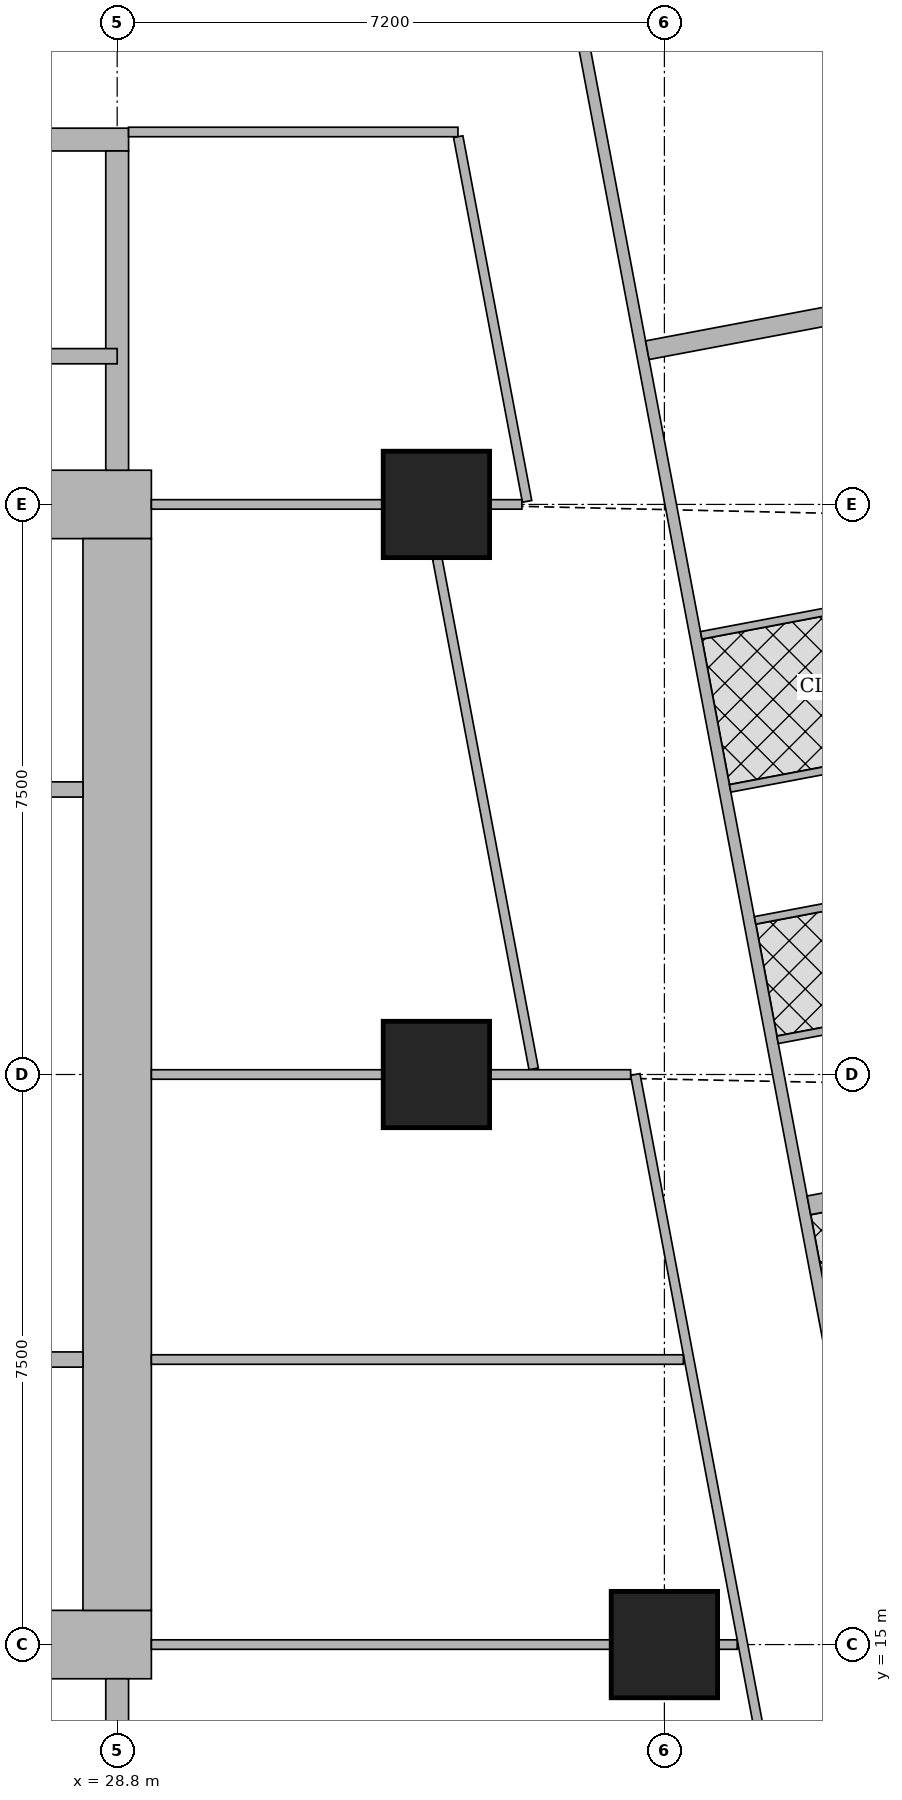
"""IFC4 building model, lengths in metres.
Left out: names, types, materials, properties, quantities, classifications, styles, units other than length and angle.
Written with IfcOpenShell. Run it as: python <this file> out.ifc"""

import sys

from ifc_helpers import new_model, si_unit, direction, frame, frame_2d, origin, origin_2d, place, context, subcontext, project, spatial, rectangle, extrude, element, fill, save


model = new_model("IFC4")
c1 = context("Model", 3, precision=1e-05, world=origin(), true_north=direction((0.0, 1.0)))
c2 = subcontext(c1, "Body", "Model", "MODEL_VIEW")
j1 = project(units=[si_unit("LENGTHUNIT", "METRE"), si_unit("PLANEANGLEUNIT", "RADIAN")], contexts=[c1])
p1 = place(None, origin())
s1 = spatial("IfcSite", under=j1, at=p1, CompositionType="ELEMENT")
p2 = place(p1, origin())
s2 = spatial("IfcBuilding", under=s1, at=p2, CompositionType="ELEMENT")
p3 = place(p2, frame((0.0, 0.0, 251.6)))
s3 = spatial("IfcBuildingStorey", under=s2, at=p3, CompositionType="ELEMENT", Elevation=251.6)
for number, where, z_axis, x_axis in (
    (1, (36.0, 15.0, 0.0), (0.0, 0.0, 1.0), (1.0, 0.0, 0.0)),
    (2, (33.0, 22.5, 0.0), (0.0, 0.0, 1.0), (1.0, 0.0, 0.0)),
    (3, (33.0, 30.0, 0.0), (0.0, 0.0, 1.0), (1.0, 0.0, 0.0)),
):
    element("IfcColumn", number, at=place(p3, frame(where, z_axis=z_axis, x_axis=x_axis)), inside=s3, PredefinedType="COLUMN", context=c2, shape_type="SweptSolid", body=[
        extrude(rectangle(XDim=1.4, YDim=1.4, at=origin_2d()), origin(), (0.0, 0.0, 1.0), 3.75),
    ])
p4 = place(p3, frame((13.95, 15.0, 0.0), z_axis=(0.0, 0.0, 1.0), x_axis=(1.0, 0.0, 0.0)))
e4 = element("IfcWall", 4, at=p4, inside=s3, PredefinedType="SHEAR", context=c2, shape_type="SweptSolid", body=[
    extrude(rectangle(XDim=15.3, YDim=0.9, at=frame_2d((7.65, 0.0))), origin(), (0.0, 0.0, 1.0), 3.75),
])
p5 = place(p4, frame((4.45, 0.0, 0.0)))
e5 = element("IfcOpeningElement", 5, at=p5, cuts=e4, PredefinedType="OPENING", context=c2, shape_type="SweptSolid", body=[
    extrude(rectangle(XDim=1.8, YDim=2.1, at=frame_2d((0.9, 1.05))), frame((0.0, 0.46, 0.0), z_axis=(0.0, -1.0, 0.0), x_axis=(1.0, 0.0, 0.0)), (0.0, 0.0, 1.0), 0.92),
])
p6 = place(p4, frame((10.7, 0.0, 0.0)))
e6 = element("IfcOpeningElement", 6, at=p6, cuts=e4, PredefinedType="OPENING", context=c2, shape_type="SweptSolid", body=[
    extrude(rectangle(XDim=1.1, YDim=2.1, at=frame_2d((0.55, 1.05))), frame((0.0, 0.46, 0.0), z_axis=(0.0, -1.0, 0.0), x_axis=(1.0, 0.0, 0.0)), (0.0, 0.0, 1.0), 0.92),
])
p7 = place(p3, frame((13.95, 30.0, 0.0), z_axis=(0.0, 0.0, 1.0), x_axis=(1.0, 0.0, 0.0)))
e7 = element("IfcWall", 7, at=p7, inside=s3, PredefinedType="SHEAR", context=c2, shape_type="SweptSolid", body=[
    extrude(rectangle(XDim=15.3, YDim=0.9, at=frame_2d((7.65, 0.0))), origin(), (0.0, 0.0, 1.0), 3.75),
])
p8 = place(p7, frame((4.45, 0.0, 0.0)))
e8 = element("IfcOpeningElement", 8, at=p8, cuts=e7, PredefinedType="OPENING", context=c2, shape_type="SweptSolid", body=[
    extrude(rectangle(XDim=1.8, YDim=2.1, at=frame_2d((0.9, 1.05))), frame((0.0, 0.46, 0.0), z_axis=(0.0, -1.0, 0.0), x_axis=(1.0, 0.0, 0.0)), (0.0, 0.0, 1.0), 0.92),
])
p9 = place(p7, frame((10.7, 0.0, 0.0)))
e9 = element("IfcOpeningElement", 9, at=p9, cuts=e7, PredefinedType="OPENING", context=c2, shape_type="SweptSolid", body=[
    extrude(rectangle(XDim=1.1, YDim=2.1, at=frame_2d((0.55, 1.05))), frame((0.0, 0.46, 0.0), z_axis=(0.0, -1.0, 0.0), x_axis=(1.0, 0.0, 0.0)), (0.0, 0.0, 1.0), 0.92),
])
p10 = place(p3, frame((28.8, 15.45, 0.0), z_axis=(0.0, 0.0, 1.0), x_axis=(0.0, 1.0, 0.0)))
e10 = element("IfcWall", 10, at=p10, inside=s3, PredefinedType="SHEAR", context=c2, shape_type="SweptSolid", body=[
    extrude(rectangle(XDim=14.1, YDim=0.9, at=frame_2d((7.05, 0.0))), origin(), (0.0, 0.0, 1.0), 3.75),
])
p11 = place(p3, frame((28.8, 10.35, 0.0), z_axis=(0.0, 0.0, 1.0), x_axis=(0.0, 1.0, 0.0)))
e11 = element("IfcWall", 11, at=p11, inside=s3, PredefinedType="SHEAR", context=c2, shape_type="SweptSolid", body=[
    extrude(rectangle(XDim=4.2, YDim=0.3, at=frame_2d((2.1, 0.0))), origin(), (0.0, 0.0, 1.0), 3.75),
])
p12 = place(p3, frame((21.45, 34.8, 0.0), z_axis=(0.0, 0.0, 1.0), x_axis=(1.0, 0.0, 0.0)))
e12 = element("IfcWall", 12, at=p12, inside=s3, PredefinedType="SHEAR", context=c2, shape_type="SweptSolid", body=[
    extrude(rectangle(XDim=7.5, YDim=0.3, at=frame_2d((3.75, 0.0))), origin(), (0.0, 0.0, 1.0), 3.75),
])
p13 = place(p12, frame((0.5, 0.0, 0.0)))
e13 = element("IfcOpeningElement", 13, at=p13, cuts=e12, PredefinedType="OPENING", context=c2, shape_type="SweptSolid", body=[
    extrude(rectangle(XDim=1.1, YDim=2.1, at=frame_2d((0.55, 1.05))), frame((0.0, 0.16, 0.0), z_axis=(0.0, -1.0, 0.0), x_axis=(1.0, 0.0, 0.0)), (0.0, 0.0, 1.0), 0.32),
])
p14 = place(p3, frame((28.8, 30.45, 0.0), z_axis=(0.0, 0.0, 1.0), x_axis=(0.0, 1.0, 0.0)))
e14 = element("IfcWall", 14, at=p14, inside=s3, PredefinedType="SHEAR", context=c2, shape_type="SweptSolid", body=[
    extrude(rectangle(XDim=4.2, YDim=0.3, at=frame_2d((2.1, 0.0))), origin(), (0.0, 0.0, 1.0), 3.75),
])
p15 = place(p3, frame((33.781, 42.186, 0.0), z_axis=(0.0, 0.0, 1.0), x_axis=(0.185593518645, -0.9826266055, 0.0)))
e15 = element("IfcWall", 15, at=p15, inside=s3, PredefinedType="SOLIDWALL", context=c2, shape_type="SweptSolid", body=[
    extrude(rectangle(XDim=35.961, YDim=0.15, at=frame_2d((17.98, 0.0))), origin(), (0.0, 0.0, 1.0), 2.5),
])
p16 = place(p15, frame((7.183, 0.0, 0.0)))
e16 = element("IfcOpeningElement", 16, at=p16, cuts=e15, PredefinedType="OPENING", context=c2, shape_type="SweptSolid", body=[
    extrude(rectangle(XDim=1.0, YDim=2.1, at=frame_2d((0.5, 1.05))), frame((0.0, 0.085, 0.0), z_axis=(0.0, -1.0, 0.0), x_axis=(1.0, 0.0, 0.0)), (0.0, 0.0, 1.0), 0.17),
])
p17 = place(p15, frame((11.76, 0.0, 0.0)))
e17 = element("IfcOpeningElement", 17, at=p17, cuts=e15, PredefinedType="OPENING", context=c2, shape_type="SweptSolid", body=[
    extrude(rectangle(XDim=1.0, YDim=2.1, at=frame_2d((0.5, 1.05))), frame((0.0, 0.085, 0.0), z_axis=(0.0, -1.0, 0.0), x_axis=(1.0, 0.0, 0.0)), (0.0, 0.0, 1.0), 0.17),
])
p18 = place(p15, frame((23.863, 0.0, 0.0)))
e18 = element("IfcOpeningElement", 18, at=p18, cuts=e15, PredefinedType="OPENING", context=c2, shape_type="SweptSolid", body=[
    extrude(rectangle(XDim=1.0, YDim=2.1, at=frame_2d((0.5, 1.05))), frame((0.0, 0.085, 0.0), z_axis=(0.0, -1.0, 0.0), x_axis=(1.0, 0.0, 0.0)), (0.0, 0.0, 1.0), 0.17),
])
p19 = place(p15, frame((30.502, 0.0, 0.0)))
e19 = element("IfcOpeningElement", 19, at=p19, cuts=e15, PredefinedType="OPENING", context=c2, shape_type="SweptSolid", body=[
    extrude(rectangle(XDim=1.0, YDim=2.1, at=frame_2d((0.5, 1.05))), frame((0.0, 0.085, 0.0), z_axis=(0.0, -1.0, 0.0), x_axis=(1.0, 0.0, 0.0)), (0.0, 0.0, 1.0), 0.17),
])
p20 = place(p3, frame((39.948, 28.933, 0.0), z_axis=(0.0, 0.0, 1.0), x_axis=(-0.982588017646, -0.185797706064, 0.0)))
e20 = element("IfcWall", 20, at=p20, inside=s3, PredefinedType="PARTITIONING", context=c2, shape_type="SweptSolid", body=[
    extrude(rectangle(XDim=3.525, YDim=0.1, at=frame_2d((1.763, 0.0))), origin(), (0.0, 0.0, 1.0), 3.5),
])
p21 = place(p3, frame((40.656, 25.183, 0.0), z_axis=(0.0, 0.0, 1.0), x_axis=(-0.982576058723, -0.185860939478, 0.0)))
e21 = element("IfcWall", 21, at=p21, inside=s3, PredefinedType="PARTITIONING", context=c2, shape_type="SweptSolid", body=[
    extrude(rectangle(XDim=3.524, YDim=0.1, at=frame_2d((1.762, 0.0))), origin(), (0.0, 0.0, 1.0), 3.5),
])
p22 = place(p3, frame((40.329, 26.918, 0.0), z_axis=(0.0, 0.0, 1.0), x_axis=(-0.982638553676, -0.185530247748, 0.0)))
e22 = element("IfcWall", 22, at=p22, inside=s3, PredefinedType="PARTITIONING", context=c2, shape_type="SweptSolid", body=[
    extrude(rectangle(XDim=3.525, YDim=0.1, at=frame_2d((1.763, 0.0))), origin(), (0.0, 0.0, 1.0), 3.5),
])
p23 = place(p3, frame((40.954, 23.61, 0.0), z_axis=(0.0, 0.0, 1.0), x_axis=(-0.98264808502, -0.18547975902, 0.0)))
e23 = element("IfcWall", 23, at=p23, inside=s3, PredefinedType="PARTITIONING", context=c2, shape_type="SweptSolid", body=[
    extrude(rectangle(XDim=3.526, YDim=0.1, at=frame_2d((1.763, 0.0))), origin(), (0.0, 0.0, 1.0), 2.5),
])
p24 = place(p3, frame((40.468, 32.915, 0.0), z_axis=(0.0, 0.0, 1.0), x_axis=(-0.982635807605, -0.185544791394, 0.0)))
e24 = element("IfcWall", 24, at=p24, inside=s3, PredefinedType="SOLIDWALL", context=c2, shape_type="SweptSolid", body=[
    extrude(rectangle(XDim=4.775, YDim=0.25, at=frame_2d((2.388, 0.0))), origin(), (0.0, 0.0, 1.0), 3.5),
])
p25 = place(p3, frame((42.593, 21.665, 0.0), z_axis=(0.0, 0.0, 1.0), x_axis=(-0.982635807605, -0.185544791394, 0.0)))
e25 = element("IfcWall", 25, at=p25, inside=s3, PredefinedType="SOLIDWALL", context=c2, shape_type="SweptSolid", body=[
    extrude(rectangle(XDim=4.775, YDim=0.25, at=frame_2d((2.388, 0.0))), origin(), (0.0, 0.0, 1.0), 2.5),
])
p26 = place(p3, frame((28.95, 34.9, 0.0), z_axis=(0.0, 0.0, 1.0), x_axis=(1.0, 0.0, 0.0)))
e26 = element("IfcWall", 26, at=p26, inside=s3, PredefinedType="PARTITIONING", context=c2, shape_type="SweptSolid", body=[
    extrude(rectangle(XDim=4.334, YDim=0.125, at=frame_2d((2.167, 0.0))), origin(), (0.0, 0.0, 1.0), 3.5),
])
p27 = place(p3, frame((37.947, 10.163, 0.0), z_axis=(0.0, 0.0, 1.0), x_axis=(-0.185589250699, 0.982627411599, 0.0)))
e27 = element("IfcWall", 27, at=p27, inside=s3, PredefinedType="PARTITIONING", context=c2, shape_type="SweptSolid", body=[
    extrude(rectangle(XDim=12.555, YDim=0.125, at=frame_2d((6.277, 0.0))), origin(), (0.0, 0.0, 1.0), 2.5),
])
p28 = place(p27, frame((0.708, 0.0, 0.0)))
e28 = element("IfcOpeningElement", 28, at=p28, cuts=e27, PredefinedType="OPENING", context=c2, shape_type="SweptSolid", body=[
    extrude(rectangle(XDim=1.0, YDim=2.1, at=frame_2d((0.5, 1.05))), frame((0.0, 0.073, 0.0), z_axis=(0.0, -1.0, 0.0), x_axis=(1.0, 0.0, 0.0)), (0.0, 0.0, 1.0), 0.145),
])
p29 = place(p27, frame((5.9, 0.0, 0.0)))
e29 = element("IfcOpeningElement", 29, at=p29, cuts=e27, PredefinedType="OPENING", context=c2, shape_type="SweptSolid", body=[
    extrude(rectangle(XDim=1.0, YDim=2.1, at=frame_2d((0.5, 1.05))), frame((0.0, 0.073, 0.0), z_axis=(0.0, -1.0, 0.0), x_axis=(1.0, 0.0, 0.0)), (0.0, 0.0, 1.0), 0.145),
])
p30 = place(p27, frame((9.562, 0.0, 0.0)))
e30 = element("IfcOpeningElement", 30, at=p30, cuts=e27, PredefinedType="OPENING", context=c2, shape_type="SweptSolid", body=[
    extrude(rectangle(XDim=1.0, YDim=2.1, at=frame_2d((0.5, 1.05))), frame((0.0, 0.073, 0.0), z_axis=(0.0, -1.0, 0.0), x_axis=(1.0, 0.0, 0.0)), (0.0, 0.0, 1.0), 0.145),
])
p31 = place(p3, frame((34.193, 30.04, 0.0), z_axis=(0.0, 0.0, 1.0), x_axis=(-0.185556349615, 0.98263362507, 0.0)))
e31 = element("IfcWall", 31, at=p31, inside=s3, PredefinedType="PARTITIONING", context=c2, shape_type="SweptSolid", body=[
    extrude(rectangle(XDim=4.883, YDim=0.125, at=frame_2d((2.441, 0.0))), origin(), (0.0, 0.0, 1.0), 2.5),
])
p32 = place(p31, frame((0.95, 0.0, 0.0)))
e32 = element("IfcOpeningElement", 32, at=p32, cuts=e31, PredefinedType="OPENING", context=c2, shape_type="SweptSolid", body=[
    extrude(rectangle(XDim=1.0, YDim=2.1, at=frame_2d((0.5, 1.05))), frame((0.0, 0.073, 0.0), z_axis=(0.0, -1.0, 0.0), x_axis=(1.0, 0.0, 0.0)), (0.0, 0.0, 1.0), 0.145),
])
p33 = place(p3, frame((34.28, 22.574, 0.0), z_axis=(0.0, 0.0, 1.0), x_axis=(-0.185610991981, 0.982623305064, 0.0)))
e33 = element("IfcWall", 33, at=p33, inside=s3, PredefinedType="PARTITIONING", context=c2, shape_type="SweptSolid", body=[
    extrude(rectangle(XDim=6.832, YDim=0.125, at=frame_2d((3.416, 0.0))), origin(), (0.0, 0.0, 1.0), 2.5),
])
p34 = place(p33, frame((3.241, 0.0, 0.0)))
e34 = element("IfcOpeningElement", 34, at=p34, cuts=e33, PredefinedType="OPENING", context=c2, shape_type="SweptSolid", body=[
    extrude(rectangle(XDim=1.0, YDim=2.1, at=frame_2d((0.5, 1.05))), frame((0.0, 0.073, 0.0), z_axis=(0.0, -1.0, 0.0), x_axis=(1.0, 0.0, 0.0)), (0.0, 0.0, 1.0), 0.145),
])
p35 = place(p3, frame((29.25, 15.0, 0.0), z_axis=(0.0, 0.0, 1.0), x_axis=(1.0, 0.0, 0.0)))
e35 = element("IfcWall", 35, at=p35, inside=s3, PredefinedType="PARTITIONING", context=c2, shape_type="SweptSolid", body=[
    extrude(rectangle(XDim=6.049, YDim=0.125, at=frame_2d((3.024, 0.0))), origin(), (0.0, 0.0, 1.0), 3.5),
])
p36 = place(p3, frame((36.701, 15.0, 0.0), z_axis=(0.0, 0.0, 1.0), x_axis=(1.0, 0.0, 0.0)))
e36 = element("IfcWall", 36, at=p36, inside=s3, PredefinedType="PARTITIONING", context=c2, shape_type="SweptSolid", body=[
    extrude(rectangle(XDim=0.257, YDim=0.125, at=frame_2d((0.128, 0.0))), origin(), (0.0, 0.0, 1.0), 3.5),
])
p37 = place(p3, frame((29.25, 18.75, 0.0), z_axis=(0.0, 0.0, 1.0), x_axis=(1.0, 0.0, 0.0)))
e37 = element("IfcWall", 37, at=p37, inside=s3, PredefinedType="PARTITIONING", context=c2, shape_type="SweptSolid", body=[
    extrude(rectangle(XDim=7.0, YDim=0.125, at=frame_2d((3.5, 0.0))), origin(), (0.0, 0.0, 1.0), 3.5),
])
p38 = place(p3, frame((29.25, 22.5, 0.0), z_axis=(0.0, 0.0, 1.0), x_axis=(1.0, 0.0, 0.0)))
e38 = element("IfcWall", 38, at=p38, inside=s3, PredefinedType="PARTITIONING", context=c2, shape_type="SweptSolid", body=[
    extrude(rectangle(XDim=3.049, YDim=0.125, at=frame_2d((1.524, 0.0))), origin(), (0.0, 0.0, 1.0), 3.5),
])
p39 = place(p3, frame((33.701, 22.5, 0.0), z_axis=(0.0, 0.0, 1.0), x_axis=(1.0, 0.0, 0.0)))
e39 = element("IfcWall", 39, at=p39, inside=s3, PredefinedType="PARTITIONING", context=c2, shape_type="SweptSolid", body=[
    extrude(rectangle(XDim=1.855, YDim=0.125, at=frame_2d((0.927, 0.0))), origin(), (0.0, 0.0, 1.0), 2.5),
])
p40 = place(p3, frame((29.25, 30.0, 0.0), z_axis=(0.0, 0.0, 1.0), x_axis=(1.0, 0.0, 0.0)))
e40 = element("IfcWall", 40, at=p40, inside=s3, PredefinedType="PARTITIONING", context=c2, shape_type="SweptSolid", body=[
    extrude(rectangle(XDim=3.049, YDim=0.125, at=frame_2d((1.524, 0.0))), origin(), (0.0, 0.0, 1.0), 3.5),
])
p41 = place(p3, frame((33.701, 30.0, 0.0), z_axis=(0.0, 0.0, 1.0), x_axis=(1.0, 0.0, 0.0)))
e41 = element("IfcWall", 41, at=p41, inside=s3, PredefinedType="PARTITIONING", context=c2, shape_type="SweptSolid", body=[
    extrude(rectangle(XDim=0.424, YDim=0.125, at=frame_2d((0.212, 0.0))), origin(), (0.0, 0.0, 1.0), 2.5),
])
p42 = place(p3, frame((23.0, 31.95, 0.0), z_axis=(0.0, 0.0, 1.0), x_axis=(1.0, 0.0, 0.0)))
e42 = element("IfcWall", 42, at=p42, inside=s3, PredefinedType="SHEAR", context=c2, shape_type="SweptSolid", body=[
    extrude(rectangle(XDim=5.8, YDim=0.2, at=frame_2d((2.9, 0.0))), origin(), (0.0, 0.0, 1.0), 3.75),
])
for number, where, z_axis, x_axis in (
    (43, (27.4, 18.75, 0.0), (0.0, 0.0, 1.0), (1.0, 0.0, 0.0)),
    (44, (27.4, 26.25, 0.0), (0.0, 0.0, 1.0), (1.0, 0.0, 0.0)),
):
    element("IfcWall", number, at=place(p3, frame(where, z_axis=z_axis, x_axis=x_axis)), inside=s3, PredefinedType="SOLIDWALL", context=c2, shape_type="SweptSolid", body=[
        extrude(rectangle(XDim=0.95, YDim=0.2, at=frame_2d((0.475, 0.0))), origin(), (0.0, 0.0, 1.0), 3.5),
    ])
p43 = place(p16, origin())
e45 = element("IfcDoor", 45, at=p43, inside=s3, OperationType="SINGLE_SWING_RIGHT", PredefinedType="DOOR", context=c2, shape_type="SweptSolid", body=[
    extrude(rectangle(XDim=1.0, YDim=2.1, at=frame_2d((0.5, 1.05))), frame((0.0, 0.025, 0.0), z_axis=(0.0, -1.0, 0.0), x_axis=(1.0, 0.0, 0.0)), (0.0, 0.0, 1.0), 0.05),
])
fill(e16, e45)
p44 = place(p17, origin())
e46 = element("IfcDoor", 46, at=p44, inside=s3, OperationType="SINGLE_SWING_RIGHT", PredefinedType="DOOR", context=c2, shape_type="SweptSolid", body=[
    extrude(rectangle(XDim=1.0, YDim=2.1, at=frame_2d((0.5, 1.05))), frame((0.0, 0.025, 0.0), z_axis=(0.0, -1.0, 0.0), x_axis=(1.0, 0.0, 0.0)), (0.0, 0.0, 1.0), 0.05),
])
fill(e17, e46)
p45 = place(p29, origin())
e47 = element("IfcDoor", 47, at=p45, inside=s3, OperationType="SINGLE_SWING_LEFT", PredefinedType="DOOR", context=c2, shape_type="SweptSolid", body=[
    extrude(rectangle(XDim=1.0, YDim=2.1, at=frame_2d((0.5, 1.05))), frame((0.0, 0.025, 0.0), z_axis=(0.0, -1.0, 0.0), x_axis=(1.0, 0.0, 0.0)), (0.0, 0.0, 1.0), 0.05),
])
fill(e29, e47)
p46 = place(p30, origin())
e48 = element("IfcDoor", 48, at=p46, inside=s3, OperationType="SINGLE_SWING_LEFT", PredefinedType="DOOR", context=c2, shape_type="SweptSolid", body=[
    extrude(rectangle(XDim=1.0, YDim=2.1, at=frame_2d((0.5, 1.05))), frame((0.0, 0.025, 0.0), z_axis=(0.0, -1.0, 0.0), x_axis=(1.0, 0.0, 0.0)), (0.0, 0.0, 1.0), 0.05),
])
fill(e30, e48)
p47 = place(p34, origin())
e49 = element("IfcDoor", 49, at=p47, inside=s3, OperationType="SINGLE_SWING_RIGHT", PredefinedType="DOOR", context=c2, shape_type="SweptSolid", body=[
    extrude(rectangle(XDim=1.0, YDim=2.1, at=frame_2d((0.5, 1.05))), frame((0.0, 0.025, 0.0), z_axis=(0.0, -1.0, 0.0), x_axis=(1.0, 0.0, 0.0)), (0.0, 0.0, 1.0), 0.05),
])
fill(e34, e49)
p48 = place(p32, origin())
e50 = element("IfcDoor", 50, at=p48, inside=s3, OperationType="SINGLE_SWING_LEFT", PredefinedType="DOOR", context=c2, shape_type="SweptSolid", body=[
    extrude(rectangle(XDim=1.0, YDim=2.1, at=frame_2d((0.5, 1.05))), frame((0.0, 0.025, 0.0), z_axis=(0.0, -1.0, 0.0), x_axis=(1.0, 0.0, 0.0)), (0.0, 0.0, 1.0), 0.05),
])
fill(e32, e50)
save(model, sys.argv[1])
